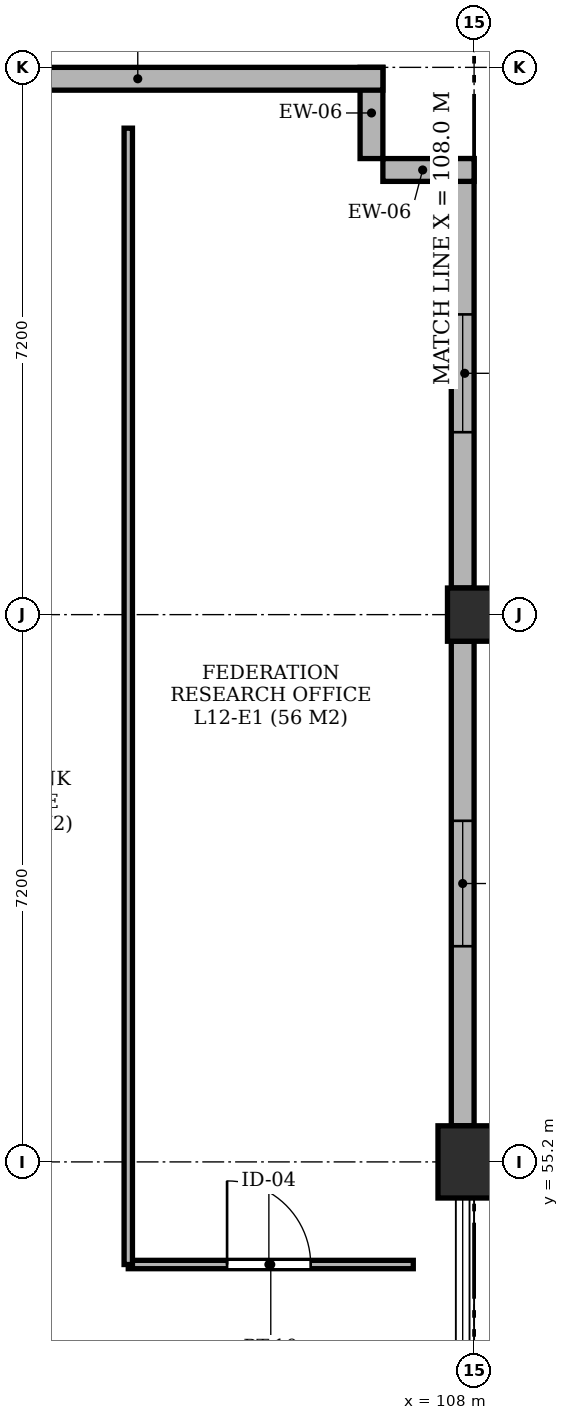
"""IFC4 building model, lengths in metres.
Left out: names, types, materials, properties, quantities, classifications, styles, units other than length and angle.
Written with IfcOpenShell. Run it as: python <this file> out.ifc"""

import sys

from ifc_helpers import new_model, si_unit, direction, frame, frame_2d, origin, origin_2d, place, context, subcontext, project, spatial, rectangle, extrude, element, fill, save


model = new_model("IFC4")
c1 = context("Model", 3, precision=1e-05, world=origin(), true_north=direction((0.0, 1.0)))
c2 = subcontext(c1, "Body", "Model", "MODEL_VIEW")
j1 = project(units=[si_unit("LENGTHUNIT", "METRE"), si_unit("PLANEANGLEUNIT", "RADIAN")], contexts=[c1])
p1 = place(None, origin())
s1 = spatial("IfcSite", under=j1, at=p1, CompositionType="ELEMENT")
p2 = place(p1, origin())
s2 = spatial("IfcBuilding", under=s1, at=p2, CompositionType="ELEMENT")
p3 = place(p2, frame((0.0, 0.0, 50.3)))
s3 = spatial("IfcBuildingStorey", under=s2, at=p3, CompositionType="ELEMENT", Elevation=50.3)
p4 = place(p3, frame((108.0, 55.2, -0.23), z_axis=(0.0, 0.0, 1.0), x_axis=(1.0, 0.0, 0.0)))
e1 = element("IfcColumn", 1, at=p4, inside=s3, PredefinedType="COLUMN", context=c2, shape_type="SweptSolid", body=[
    extrude(rectangle(XDim=0.95, YDim=0.95, at=origin_2d()), origin(), (0.0, 0.0, 1.0), 3.26),
])
p5 = place(p3, frame((108.0, 62.4, -0.23), z_axis=(0.0, 0.0, 1.0), x_axis=(1.0, 0.0, 0.0)))
e2 = element("IfcColumn", 2, at=p5, inside=s3, PredefinedType="COLUMN", context=c2, shape_type="SweptSolid", body=[
    extrude(rectangle(XDim=0.7, YDim=0.7, at=origin_2d()), origin(), (0.0, 0.0, 1.0), 3.26),
])
p6 = place(p3, frame((107.85, 55.675, 0.0), z_axis=(0.0, 0.0, 1.0), x_axis=(0.0, 1.0, 0.0)))
e3 = element("IfcWall", 3, at=p6, inside=s3, PredefinedType="SOLIDWALL", context=c2, shape_type="SweptSolid", body=[
    extrude(rectangle(XDim=6.375, YDim=0.3, at=frame_2d((3.188, 0.0))), origin(), (0.0, 0.0, 1.0), 2.53),
])
p7 = place(p6, frame((2.363, 0.0, 0.62)))
e4 = element("IfcOpeningElement", 4, at=p7, cuts=e3, PredefinedType="OPENING", context=c2, shape_type="SweptSolid", body=[
    extrude(rectangle(XDim=1.65, YDim=1.81, at=frame_2d((0.825, 0.905))), frame((0.0, 0.162, 0.0), z_axis=(0.0, -1.0, 0.0), x_axis=(1.0, 0.0, 0.0)), (0.0, 0.0, 1.0), 0.324),
])
p8 = place(p3, frame((107.85, 62.75, 0.0), z_axis=(0.0, 0.0, 1.0), x_axis=(0.0, 1.0, 0.0)))
e5 = element("IfcWall", 5, at=p8, inside=s3, PredefinedType="SOLIDWALL", context=c2, shape_type="SweptSolid", body=[
    extrude(rectangle(XDim=5.65, YDim=0.3, at=frame_2d((2.825, 0.0))), origin(), (0.0, 0.0, 1.0), 2.53),
])
p9 = place(p8, frame((2.05, 0.0, 0.62)))
e6 = element("IfcOpeningElement", 6, at=p9, cuts=e5, PredefinedType="OPENING", context=c2, shape_type="SweptSolid", body=[
    extrude(rectangle(XDim=1.55, YDim=1.81, at=frame_2d((0.775, 0.905))), frame((0.0, 0.162, 0.0), z_axis=(0.0, -1.0, 0.0), x_axis=(1.0, 0.0, 0.0)), (0.0, 0.0, 1.0), 0.324),
])
p10 = place(p3, frame((108.0, 68.25, 0.0), z_axis=(0.0, 0.0, 1.0), x_axis=(-1.0, 0.0, 0.0)))
e7 = element("IfcWall", 7, at=p10, inside=s3, PredefinedType="SOLIDWALL", context=c2, shape_type="SweptSolid", body=[
    extrude(rectangle(XDim=1.2, YDim=0.3, at=frame_2d((0.6, 0.0))), origin(), (0.0, 0.0, 1.0), 2.53),
])
p11 = place(p3, frame((106.65, 68.4, 0.0), z_axis=(0.0, 0.0, 1.0), x_axis=(0.0, 1.0, 0.0)))
e8 = element("IfcWall", 8, at=p11, inside=s3, PredefinedType="SOLIDWALL", context=c2, shape_type="SweptSolid", body=[
    extrude(rectangle(XDim=1.2, YDim=0.3, at=frame_2d((0.6, 0.0))), origin(), (0.0, 0.0, 1.0), 2.53),
])
p12 = place(p3, frame((106.8, 69.45, 0.0), z_axis=(0.0, 0.0, 1.0), x_axis=(-1.0, 0.0, 0.0)))
e9 = element("IfcWall", 9, at=p12, inside=s3, PredefinedType="SOLIDWALL", context=c2, shape_type="SweptSolid", body=[
    extrude(rectangle(XDim=6.45, YDim=0.3, at=frame_2d((3.225, 0.0))), origin(), (0.0, 0.0, 1.0), 2.53),
])
p13 = place(p12, frame((4.8, 0.0, 0.62)))
e10 = element("IfcOpeningElement", 10, at=p13, cuts=e9, PredefinedType="OPENING", context=c2, shape_type="SweptSolid", body=[
    extrude(rectangle(XDim=1.2, YDim=1.65, at=frame_2d((0.6, 0.825))), frame((0.0, 0.162, 0.0), z_axis=(0.0, -1.0, 0.0), x_axis=(1.0, 0.0, 0.0)), (0.0, 0.0, 1.0), 0.324),
])
p14 = place(p3, frame((103.45, 53.85, 0.0), z_axis=(0.0, 0.0, 1.0), x_axis=(1.0, 0.0, 0.0)))
e11 = element("IfcWall", 11, at=p14, inside=s3, PredefinedType="PARTITIONING", context=c2, shape_type="SweptSolid", body=[
    extrude(rectangle(XDim=3.75, YDim=0.11, at=frame_2d((1.875, 0.0))), origin(), (0.0, 0.0, 1.0), 2.53),
])
p15 = place(p14, frame((1.3, 0.0, 0.0)))
e12 = element("IfcOpeningElement", 12, at=p15, cuts=e11, PredefinedType="OPENING", context=c2, shape_type="SweptSolid", body=[
    extrude(rectangle(XDim=1.1, YDim=2.15, at=frame_2d((0.55, 1.075))), frame((0.0, 0.067, 0.0), z_axis=(0.0, -1.0, 0.0), x_axis=(1.0, 0.0, 0.0)), (0.0, 0.0, 1.0), 0.134),
])
p16 = place(p3, frame((103.45, 53.85, 0.0), z_axis=(0.0, 0.0, 1.0), x_axis=(0.0, 1.0, 0.0)))
e13 = element("IfcWall", 13, at=p16, inside=s3, PredefinedType="PARTITIONING", context=c2, shape_type="SweptSolid", body=[
    extrude(rectangle(XDim=14.95, YDim=0.11, at=frame_2d((7.475, 0.0))), origin(), (0.0, 0.0, 1.0), 2.53),
])
p17 = place(p7, origin())
e14 = element("IfcWindow", 14, at=p17, inside=s3, PartitioningType="SINGLE_PANEL", PredefinedType="WINDOW", context=c2, shape_type="SweptSolid", body=[
    extrude(rectangle(XDim=1.65, YDim=1.81, at=frame_2d((0.825, 0.905))), frame((0.0, 0.03, 0.0), z_axis=(0.0, -1.0, 0.0), x_axis=(1.0, 0.0, 0.0)), (0.0, 0.0, 1.0), 0.06),
])
fill(e4, e14)
p18 = place(p9, origin())
e15 = element("IfcWindow", 15, at=p18, inside=s3, PartitioningType="SINGLE_PANEL", PredefinedType="WINDOW", context=c2, shape_type="SweptSolid", body=[
    extrude(rectangle(XDim=1.55, YDim=1.81, at=frame_2d((0.775, 0.905))), frame((0.0, 0.03, 0.0), z_axis=(0.0, -1.0, 0.0), x_axis=(1.0, 0.0, 0.0)), (0.0, 0.0, 1.0), 0.06),
])
fill(e6, e15)
p19 = place(p15, origin())
e16 = element("IfcDoor", 16, at=p19, inside=s3, OperationType="SINGLE_SWING_LEFT", PredefinedType="DOOR", context=c2, shape_type="SweptSolid", body=[
    extrude(rectangle(XDim=1.1, YDim=2.15, at=frame_2d((0.55, 1.075))), frame((0.0, 0.025, 0.0), z_axis=(0.0, -1.0, 0.0), x_axis=(1.0, 0.0, 0.0)), (0.0, 0.0, 1.0), 0.05),
])
fill(e12, e16)
save(model, sys.argv[1])
